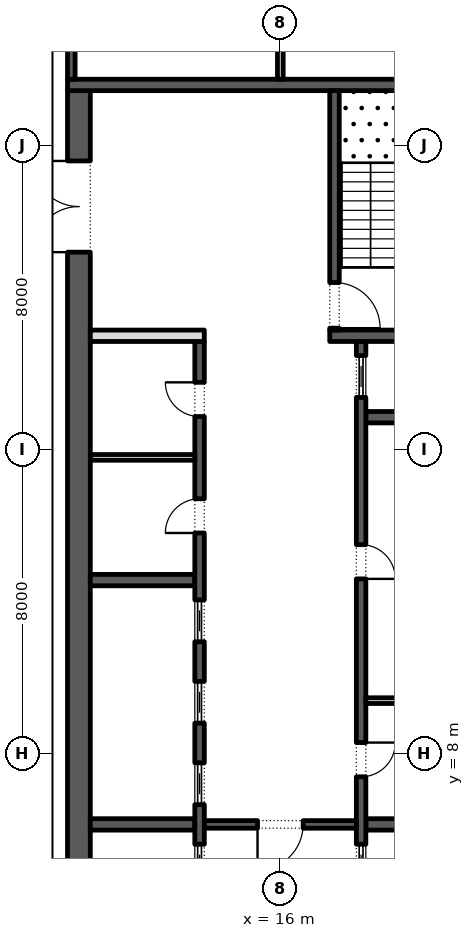
"""IFC4 building model, lengths in metres.
Left out: names, types, materials, properties, quantities, classifications, styles, units other than length and angle.
Written with IfcOpenShell. Run it as: python <this file> out.ifc"""

import sys

from ifc_helpers import new_model, si_unit, direction, frame, frame_2d, origin, place, context, subcontext, project, spatial, rectangle, extrude, element, fill, save


model = new_model("IFC4")
c1 = context("Model", 3, precision=1e-05, world=origin(), true_north=direction((0.0, 1.0)))
c2 = subcontext(c1, "Body", "Model", "MODEL_VIEW")
j1 = project(units=[si_unit("LENGTHUNIT", "METRE"), si_unit("PLANEANGLEUNIT", "RADIAN")], contexts=[c1])
p1 = place(None, origin())
s1 = spatial("IfcSite", under=j1, at=p1, CompositionType="ELEMENT")
p2 = place(p1, origin())
s2 = spatial("IfcBuilding", under=s1, at=p2, CompositionType="ELEMENT")
p3 = place(p2, frame((0.0, 0.0, 285.0)))
s3 = spatial("IfcBuildingStorey", under=s2, at=p3, CompositionType="ELEMENT", Elevation=285.0)
p4 = place(p3, frame((10.7, -2.45, 0.0), z_axis=(0.0, 0.0, 1.0), x_axis=(0.0, 1.0, 0.0)))
e1 = element("IfcWall", 1, at=p4, inside=s3, PredefinedType="SHEAR", context=c2, shape_type="SweptSolid", body=[
    extrude(rectangle(XDim=27.9, YDim=0.6, at=frame_2d((13.95, 0.0))), origin(), (0.0, 0.0, 1.0), 4.0),
])
p5 = place(p4, frame((23.65, 0.0, 0.0)))
e2 = element("IfcOpeningElement", 2, at=p5, cuts=e1, PredefinedType="OPENING", context=c2, shape_type="SweptSolid", body=[
    extrude(rectangle(XDim=2.4, YDim=2.1, at=frame_2d((1.2, 1.05))), frame((0.0, 0.31, 0.0), z_axis=(0.0, -1.0, 0.0), x_axis=(1.0, 0.0, 0.0)), (0.0, 0.0, 1.0), 0.62),
])
p6 = place(p4, frame((1.087, 0.0, 0.0)))
e3 = element("IfcOpeningElement", 3, at=p6, cuts=e1, PredefinedType="OPENING", context=c2, shape_type="SweptSolid", body=[
    extrude(rectangle(XDim=0.9, YDim=2.1, at=frame_2d((0.45, 1.05))), frame((0.0, 0.31, 0.0), z_axis=(0.0, -1.0, 0.0), x_axis=(1.0, 0.0, 0.0)), (0.0, 0.0, 1.0), 0.62),
])
p7 = place(p4, frame((4.262, 0.0, 0.0)))
e4 = element("IfcOpeningElement", 4, at=p7, cuts=e1, PredefinedType="OPENING", context=c2, shape_type="SweptSolid", body=[
    extrude(rectangle(XDim=1.0, YDim=2.1, at=frame_2d((0.5, 1.05))), frame((0.0, 0.31, 0.0), z_axis=(0.0, -1.0, 0.0), x_axis=(1.0, 0.0, 0.0)), (0.0, 0.0, 1.0), 0.62),
])
p8 = place(p3, frame((10.4, 25.6, 0.0), z_axis=(0.0, 0.0, 1.0), x_axis=(1.0, 0.0, 0.0)))
e5 = element("IfcWall", 5, at=p8, inside=s3, PredefinedType="SHEAR", context=c2, shape_type="SweptSolid", body=[
    extrude(rectangle(XDim=11.2, YDim=0.3, at=frame_2d((5.6, 0.0))), origin(), (0.0, 0.0, 1.0), 4.0),
])
p9 = place(p3, frame((17.3, 19.0, 0.0), z_axis=(0.0, 0.0, 1.0), x_axis=(1.0, 0.0, 0.0)))
e6 = element("IfcWall", 6, at=p9, inside=s3, PredefinedType="SHEAR", context=c2, shape_type="SweptSolid", body=[
    extrude(rectangle(XDim=3.7, YDim=0.3, at=frame_2d((1.85, 0.0))), origin(), (0.0, 0.0, 1.0), 4.0),
])
p10 = place(p3, frame((17.425, 19.15, 0.0), z_axis=(0.0, 0.0, 1.0), x_axis=(0.0, 1.0, 0.0)))
e7 = element("IfcWall", 7, at=p10, inside=s3, PredefinedType="SHEAR", context=c2, shape_type="SweptSolid", body=[
    extrude(rectangle(XDim=6.3, YDim=0.25, at=frame_2d((3.15, 0.0))), origin(), (0.0, 0.0, 1.0), 4.0),
])
p11 = place(p10, frame((0.05, 0.0, 0.0)))
e8 = element("IfcOpeningElement", 8, at=p11, cuts=e7, PredefinedType="OPENING", context=c2, shape_type="SweptSolid", body=[
    extrude(rectangle(XDim=1.2, YDim=2.1, at=frame_2d((0.6, 1.05))), frame((0.0, 0.135, 0.0), z_axis=(0.0, -1.0, 0.0), x_axis=(1.0, 0.0, 0.0)), (0.0, 0.0, 1.0), 0.27),
])
for number, where, z_axis, x_axis in (
    (9, (18.25, 6.143, 0.0), (0.0, 0.0, 1.0), (1.0, 0.0, 0.0)),
    (10, (18.25, 16.857, 0.0), (0.0, 0.0, 1.0), (1.0, 0.0, 0.0)),
):
    element("IfcWall", number, at=place(p3, frame(where, z_axis=z_axis, x_axis=x_axis)), inside=s3, PredefinedType="SHEAR", context=c2, shape_type="SweptSolid", body=[
        extrude(rectangle(XDim=2.75, YDim=0.3, at=frame_2d((1.375, 0.0))), origin(), (0.0, 0.0, 1.0), 4.0),
    ])
p12 = place(p3, frame((18.125, 4.15, 0.0), z_axis=(0.0, 0.0, 1.0), x_axis=(0.0, 1.0, 0.0)))
e11 = element("IfcWall", 11, at=p12, inside=s3, PredefinedType="SHEAR", context=c2, shape_type="SweptSolid", body=[
    extrude(rectangle(XDim=14.7, YDim=0.25, at=frame_2d((7.35, 0.0))), origin(), (0.0, 0.0, 1.0), 4.0),
])
p13 = place(p12, frame((3.246, 0.0, 0.0)))
e12 = element("IfcOpeningElement", 12, at=p13, cuts=e11, PredefinedType="OPENING", context=c2, shape_type="SweptSolid", body=[
    extrude(rectangle(XDim=0.9, YDim=2.1, at=frame_2d((0.45, 1.05))), frame((0.0, 0.135, 0.0), z_axis=(0.0, -1.0, 0.0), x_axis=(1.0, 0.0, 0.0)), (0.0, 0.0, 1.0), 0.27),
])
p14 = place(p12, frame((8.454, 0.0, 0.0)))
e13 = element("IfcOpeningElement", 13, at=p14, cuts=e11, PredefinedType="OPENING", context=c2, shape_type="SweptSolid", body=[
    extrude(rectangle(XDim=0.9, YDim=2.1, at=frame_2d((0.45, 1.05))), frame((0.0, 0.135, 0.0), z_axis=(0.0, -1.0, 0.0), x_axis=(1.0, 0.0, 0.0)), (0.0, 0.0, 1.0), 0.27),
])
p15 = place(p12, frame((0.371, 0.0, 0.0)))
e14 = element("IfcOpeningElement", 14, at=p15, cuts=e11, PredefinedType="OPENING", context=c2, shape_type="SweptSolid", body=[
    extrude(rectangle(XDim=1.1, YDim=2.1, at=frame_2d((0.55, 1.05))), frame((0.0, 0.135, 0.0), z_axis=(0.0, -1.0, 0.0), x_axis=(1.0, 0.0, 0.0)), (0.0, 0.0, 1.0), 0.27),
])
p16 = place(p12, frame((13.229, 0.0, 0.0)))
e15 = element("IfcOpeningElement", 15, at=p16, cuts=e11, PredefinedType="OPENING", context=c2, shape_type="SweptSolid", body=[
    extrude(rectangle(XDim=1.1, YDim=2.1, at=frame_2d((0.55, 1.05))), frame((0.0, 0.135, 0.0), z_axis=(0.0, -1.0, 0.0), x_axis=(1.0, 0.0, 0.0)), (0.0, 0.0, 1.0), 0.27),
])
p17 = place(p3, frame((18.25, 9.4, 0.0), z_axis=(0.0, 0.0, 1.0), x_axis=(1.0, 0.0, 0.0)))
e16 = element("IfcWall", 16, at=p17, inside=s3, PredefinedType="PARTITIONING", context=c2, shape_type="SweptSolid", body=[
    extrude(rectangle(XDim=2.75, YDim=0.15, at=frame_2d((1.375, 0.0))), origin(), (0.0, 0.0, 1.0), 4.0),
])
for number, where, z_axis, x_axis in (
    (17, (11.0, 6.143, 0.0), (0.0, 0.0, 1.0), (1.0, 0.0, 0.0)),
    (18, (11.0, 12.571, 0.0), (0.0, 0.0, 1.0), (1.0, 0.0, 0.0)),
):
    element("IfcWall", number, at=place(p3, frame(where, z_axis=z_axis, x_axis=x_axis)), inside=s3, PredefinedType="SHEAR", context=c2, shape_type="SweptSolid", body=[
        extrude(rectangle(XDim=2.75, YDim=0.3, at=frame_2d((1.375, 0.0))), origin(), (0.0, 0.0, 1.0), 4.0),
    ])
p18 = place(p3, frame((13.875, -2.45, 0.0), z_axis=(0.0, 0.0, 1.0), x_axis=(0.0, 1.0, 0.0)))
e19 = element("IfcWall", 19, at=p18, inside=s3, PredefinedType="SHEAR", context=c2, shape_type="SweptSolid", body=[
    extrude(rectangle(XDim=21.3, YDim=0.25, at=frame_2d((10.65, 0.0))), origin(), (0.0, 0.0, 1.0), 4.0),
])
p19 = place(p18, frame((16.261, 0.0, 0.0)))
e20 = element("IfcOpeningElement", 20, at=p19, cuts=e19, PredefinedType="OPENING", context=c2, shape_type="SweptSolid", body=[
    extrude(rectangle(XDim=0.9, YDim=2.1, at=frame_2d((0.45, 1.05))), frame((0.0, 0.135, 0.0), z_axis=(0.0, -1.0, 0.0), x_axis=(1.0, 0.0, 0.0)), (0.0, 0.0, 1.0), 0.27),
])
p20 = place(p18, frame((19.325, 0.0, 0.0)))
e21 = element("IfcOpeningElement", 21, at=p20, cuts=e19, PredefinedType="OPENING", context=c2, shape_type="SweptSolid", body=[
    extrude(rectangle(XDim=0.9, YDim=2.1, at=frame_2d((0.45, 1.05))), frame((0.0, 0.135, 0.0), z_axis=(0.0, -1.0, 0.0), x_axis=(1.0, 0.0, 0.0)), (0.0, 0.0, 1.0), 0.27),
])
p21 = place(p18, frame((6.971, 0.0, 0.0)))
e22 = element("IfcOpeningElement", 22, at=p21, cuts=e19, PredefinedType="OPENING", context=c2, shape_type="SweptSolid", body=[
    extrude(rectangle(XDim=1.1, YDim=2.1, at=frame_2d((0.55, 1.05))), frame((0.0, 0.135, 0.0), z_axis=(0.0, -1.0, 0.0), x_axis=(1.0, 0.0, 0.0)), (0.0, 0.0, 1.0), 0.27),
])
p22 = place(p18, frame((9.114, 0.0, 0.0)))
e23 = element("IfcOpeningElement", 23, at=p22, cuts=e19, PredefinedType="OPENING", context=c2, shape_type="SweptSolid", body=[
    extrude(rectangle(XDim=1.1, YDim=2.1, at=frame_2d((0.55, 1.05))), frame((0.0, 0.135, 0.0), z_axis=(0.0, -1.0, 0.0), x_axis=(1.0, 0.0, 0.0)), (0.0, 0.0, 1.0), 0.27),
])
p23 = place(p18, frame((11.257, 0.0, 0.0)))
e24 = element("IfcOpeningElement", 24, at=p23, cuts=e19, PredefinedType="OPENING", context=c2, shape_type="SweptSolid", body=[
    extrude(rectangle(XDim=1.1, YDim=2.1, at=frame_2d((0.55, 1.05))), frame((0.0, 0.135, 0.0), z_axis=(0.0, -1.0, 0.0), x_axis=(1.0, 0.0, 0.0)), (0.0, 0.0, 1.0), 0.27),
])
p24 = place(p18, frame((13.4, 0.0, 0.0)))
e25 = element("IfcOpeningElement", 25, at=p24, cuts=e19, PredefinedType="OPENING", context=c2, shape_type="SweptSolid", body=[
    extrude(rectangle(XDim=1.1, YDim=2.1, at=frame_2d((0.55, 1.05))), frame((0.0, 0.135, 0.0), z_axis=(0.0, -1.0, 0.0), x_axis=(1.0, 0.0, 0.0)), (0.0, 0.0, 1.0), 0.27),
])
p25 = place(p3, frame((11.0, 19.0, 0.0), z_axis=(0.0, 0.0, 1.0), x_axis=(1.0, 0.0, 0.0)))
e26 = element("IfcWall", 26, at=p25, inside=s3, PredefinedType="PARTITIONING", context=c2, shape_type="SweptSolid", body=[
    extrude(rectangle(XDim=3.0, YDim=0.3, at=frame_2d((1.5, 0.0))), origin(), (0.0, 0.0, 1.0), 4.0),
])
p26 = place(p3, frame((11.0, 15.8, 0.0), z_axis=(0.0, 0.0, 1.0), x_axis=(1.0, 0.0, 0.0)))
e27 = element("IfcWall", 27, at=p26, inside=s3, PredefinedType="PARTITIONING", context=c2, shape_type="SweptSolid", body=[
    extrude(rectangle(XDim=2.75, YDim=0.15, at=frame_2d((1.375, 0.0))), origin(), (0.0, 0.0, 1.0), 4.0),
])
p27 = place(p3, frame((14.0, 6.143, 0.0), z_axis=(0.0, 0.0, 1.0), x_axis=(1.0, 0.0, 0.0)))
e28 = element("IfcWall", 28, at=p27, inside=s3, PredefinedType="SHEAR", context=c2, shape_type="SweptSolid", body=[
    extrude(rectangle(XDim=4.0, YDim=0.2, at=frame_2d((2.0, 0.0))), origin(), (0.0, 0.0, 1.0), 4.0),
])
p28 = place(p27, frame((1.4, 0.0, 0.0)))
e29 = element("IfcOpeningElement", 29, at=p28, cuts=e28, PredefinedType="OPENING", context=c2, shape_type="SweptSolid", body=[
    extrude(rectangle(XDim=1.2, YDim=2.1, at=frame_2d((0.6, 1.05))), frame((0.0, 0.11, 0.0), z_axis=(0.0, -1.0, 0.0), x_axis=(1.0, 0.0, 0.0)), (0.0, 0.0, 1.0), 0.22),
])
p29 = place(p3, frame((10.5, 25.75, 0.0), z_axis=(0.0, 0.0, 1.0), x_axis=(0.0, 1.0, 0.0)))
e30 = element("IfcWall", 30, at=p29, inside=s3, PredefinedType="SHEAR", context=c2, shape_type="SweptSolid", body=[
    extrude(rectangle(XDim=4.75, YDim=0.2, at=frame_2d((2.375, 0.0))), origin(), (0.0, 0.0, 1.0), 4.0),
])
p30 = place(p29, frame((1.925, 0.0, 0.0)))
e31 = element("IfcOpeningElement", 31, at=p30, cuts=e30, PredefinedType="OPENING", context=c2, shape_type="SweptSolid", body=[
    extrude(rectangle(XDim=0.9, YDim=2.1, at=frame_2d((0.45, 1.05))), frame((0.0, 0.11, 0.0), z_axis=(0.0, -1.0, 0.0), x_axis=(1.0, 0.0, 0.0)), (0.0, 0.0, 1.0), 0.22),
])
p31 = place(p3, frame((16.0, 25.75, 0.0), z_axis=(0.0, 0.0, 1.0), x_axis=(0.0, 1.0, 0.0)))
e32 = element("IfcWall", 32, at=p31, inside=s3, PredefinedType="PARTITIONING", context=c2, shape_type="SweptSolid", body=[
    extrude(rectangle(XDim=4.75, YDim=0.15, at=frame_2d((2.375, 0.0))), origin(), (0.0, 0.0, 1.0), 4.0),
])
p32 = place(p13, frame((0.9, -0.2, 0.0), z_axis=(0.0, 0.0, 1.0), x_axis=(-1.0, 0.0, 0.0)))
e33 = element("IfcDoor", 33, at=p32, inside=s3, OperationType="SINGLE_SWING_RIGHT", PredefinedType="DOOR", context=c2, shape_type="SweptSolid", body=[
    extrude(rectangle(XDim=0.9, YDim=2.1, at=frame_2d((0.45, 1.05))), frame((0.0, -0.075, 0.0), z_axis=(0.0, -1.0, 0.0), x_axis=(1.0, 0.0, 0.0)), (0.0, 0.0, 1.0), 0.05),
])
fill(e12, e33)
p33 = place(p14, frame((0.9, -0.2, 0.0), z_axis=(0.0, 0.0, 1.0), x_axis=(-1.0, 0.0, 0.0)))
e34 = element("IfcDoor", 34, at=p33, inside=s3, OperationType="SINGLE_SWING_LEFT", PredefinedType="DOOR", context=c2, shape_type="SweptSolid", body=[
    extrude(rectangle(XDim=0.9, YDim=2.1, at=frame_2d((0.45, 1.05))), frame((0.0, -0.075, 0.0), z_axis=(0.0, -1.0, 0.0), x_axis=(1.0, 0.0, 0.0)), (0.0, 0.0, 1.0), 0.05),
])
fill(e13, e34)
p34 = place(p15, origin())
e35 = element("IfcDoor", 35, at=p34, inside=s3, OperationType="SLIDING_TO_LEFT", PredefinedType="DOOR", context=c2, shape_type="SweptSolid", body=[
    extrude(rectangle(XDim=1.1, YDim=2.1, at=frame_2d((0.55, 1.05))), frame((0.0, 0.025, 0.0), z_axis=(0.0, -1.0, 0.0), x_axis=(1.0, 0.0, 0.0)), (0.0, 0.0, 1.0), 0.05),
])
fill(e14, e35)
p35 = place(p16, origin())
e36 = element("IfcDoor", 36, at=p35, inside=s3, OperationType="SLIDING_TO_LEFT", PredefinedType="DOOR", context=c2, shape_type="SweptSolid", body=[
    extrude(rectangle(XDim=1.1, YDim=2.1, at=frame_2d((0.55, 1.05))), frame((0.0, 0.025, 0.0), z_axis=(0.0, -1.0, 0.0), x_axis=(1.0, 0.0, 0.0)), (0.0, 0.0, 1.0), 0.05),
])
fill(e15, e36)
p36 = place(p19, origin())
e37 = element("IfcDoor", 37, at=p36, inside=s3, OperationType="SINGLE_SWING_RIGHT", PredefinedType="DOOR", context=c2, shape_type="SweptSolid", body=[
    extrude(rectangle(XDim=0.9, YDim=2.1, at=frame_2d((0.45, 1.05))), frame((0.0, 0.125, 0.0), z_axis=(0.0, -1.0, 0.0), x_axis=(1.0, 0.0, 0.0)), (0.0, 0.0, 1.0), 0.05),
])
fill(e20, e37)
p37 = place(p20, origin())
e38 = element("IfcDoor", 38, at=p37, inside=s3, OperationType="SINGLE_SWING_LEFT", PredefinedType="DOOR", context=c2, shape_type="SweptSolid", body=[
    extrude(rectangle(XDim=0.9, YDim=2.1, at=frame_2d((0.45, 1.05))), frame((0.0, 0.125, 0.0), z_axis=(0.0, -1.0, 0.0), x_axis=(1.0, 0.0, 0.0)), (0.0, 0.0, 1.0), 0.05),
])
fill(e21, e38)
p38 = place(p21, origin())
e39 = element("IfcDoor", 39, at=p38, inside=s3, OperationType="SLIDING_TO_LEFT", PredefinedType="DOOR", context=c2, shape_type="SweptSolid", body=[
    extrude(rectangle(XDim=1.1, YDim=2.1, at=frame_2d((0.55, 1.05))), frame((0.0, 0.025, 0.0), z_axis=(0.0, -1.0, 0.0), x_axis=(1.0, 0.0, 0.0)), (0.0, 0.0, 1.0), 0.05),
])
fill(e22, e39)
p39 = place(p22, origin())
e40 = element("IfcDoor", 40, at=p39, inside=s3, OperationType="SLIDING_TO_LEFT", PredefinedType="DOOR", context=c2, shape_type="SweptSolid", body=[
    extrude(rectangle(XDim=1.1, YDim=2.1, at=frame_2d((0.55, 1.05))), frame((0.0, 0.025, 0.0), z_axis=(0.0, -1.0, 0.0), x_axis=(1.0, 0.0, 0.0)), (0.0, 0.0, 1.0), 0.05),
])
fill(e23, e40)
p40 = place(p23, origin())
e41 = element("IfcDoor", 41, at=p40, inside=s3, OperationType="SLIDING_TO_LEFT", PredefinedType="DOOR", context=c2, shape_type="SweptSolid", body=[
    extrude(rectangle(XDim=1.1, YDim=2.1, at=frame_2d((0.55, 1.05))), frame((0.0, 0.025, 0.0), z_axis=(0.0, -1.0, 0.0), x_axis=(1.0, 0.0, 0.0)), (0.0, 0.0, 1.0), 0.05),
])
fill(e24, e41)
p41 = place(p24, origin())
e42 = element("IfcDoor", 42, at=p41, inside=s3, OperationType="SLIDING_TO_LEFT", PredefinedType="DOOR", context=c2, shape_type="SweptSolid", body=[
    extrude(rectangle(XDim=1.1, YDim=2.1, at=frame_2d((0.55, 1.05))), frame((0.0, 0.025, 0.0), z_axis=(0.0, -1.0, 0.0), x_axis=(1.0, 0.0, 0.0)), (0.0, 0.0, 1.0), 0.05),
])
fill(e25, e42)
p42 = place(p28, frame((1.2, 0.0, 0.0), z_axis=(0.0, 0.0, 1.0), x_axis=(-1.0, 0.0, 0.0)))
e43 = element("IfcDoor", 43, at=p42, inside=s3, OperationType="SINGLE_SWING_LEFT", PredefinedType="DOOR", context=c2, shape_type="SweptSolid", body=[
    extrude(rectangle(XDim=1.2, YDim=2.1, at=frame_2d((0.6, 1.05))), frame((0.0, 0.025, 0.0), z_axis=(0.0, -1.0, 0.0), x_axis=(1.0, 0.0, 0.0)), (0.0, 0.0, 1.0), 0.05),
])
fill(e29, e43)
p43 = place(p5, origin())
e44 = element("IfcDoor", 44, at=p43, inside=s3, OperationType="DOUBLE_DOOR_SINGLE_SWING", PredefinedType="DOOR", context=c2, shape_type="SweptSolid", body=[
    extrude(rectangle(XDim=2.4, YDim=2.1, at=frame_2d((1.2, 1.05))), frame((0.0, 0.025, 0.0), z_axis=(0.0, -1.0, 0.0), x_axis=(1.0, 0.0, 0.0)), (0.0, 0.0, 1.0), 0.05),
])
fill(e2, e44)
p44 = place(p11, frame((1.2, 0.0, 0.0), z_axis=(0.0, 0.0, 1.0), x_axis=(-1.0, 0.0, 0.0)))
e45 = element("IfcDoor", 45, at=p44, inside=s3, OperationType="SINGLE_SWING_LEFT", PredefinedType="DOOR", context=c2, shape_type="SweptSolid", body=[
    extrude(rectangle(XDim=1.2, YDim=2.1, at=frame_2d((0.6, 1.05))), frame((0.0, 0.025, 0.0), z_axis=(0.0, -1.0, 0.0), x_axis=(1.0, 0.0, 0.0)), (0.0, 0.0, 1.0), 0.05),
])
fill(e8, e45)
save(model, sys.argv[1])
